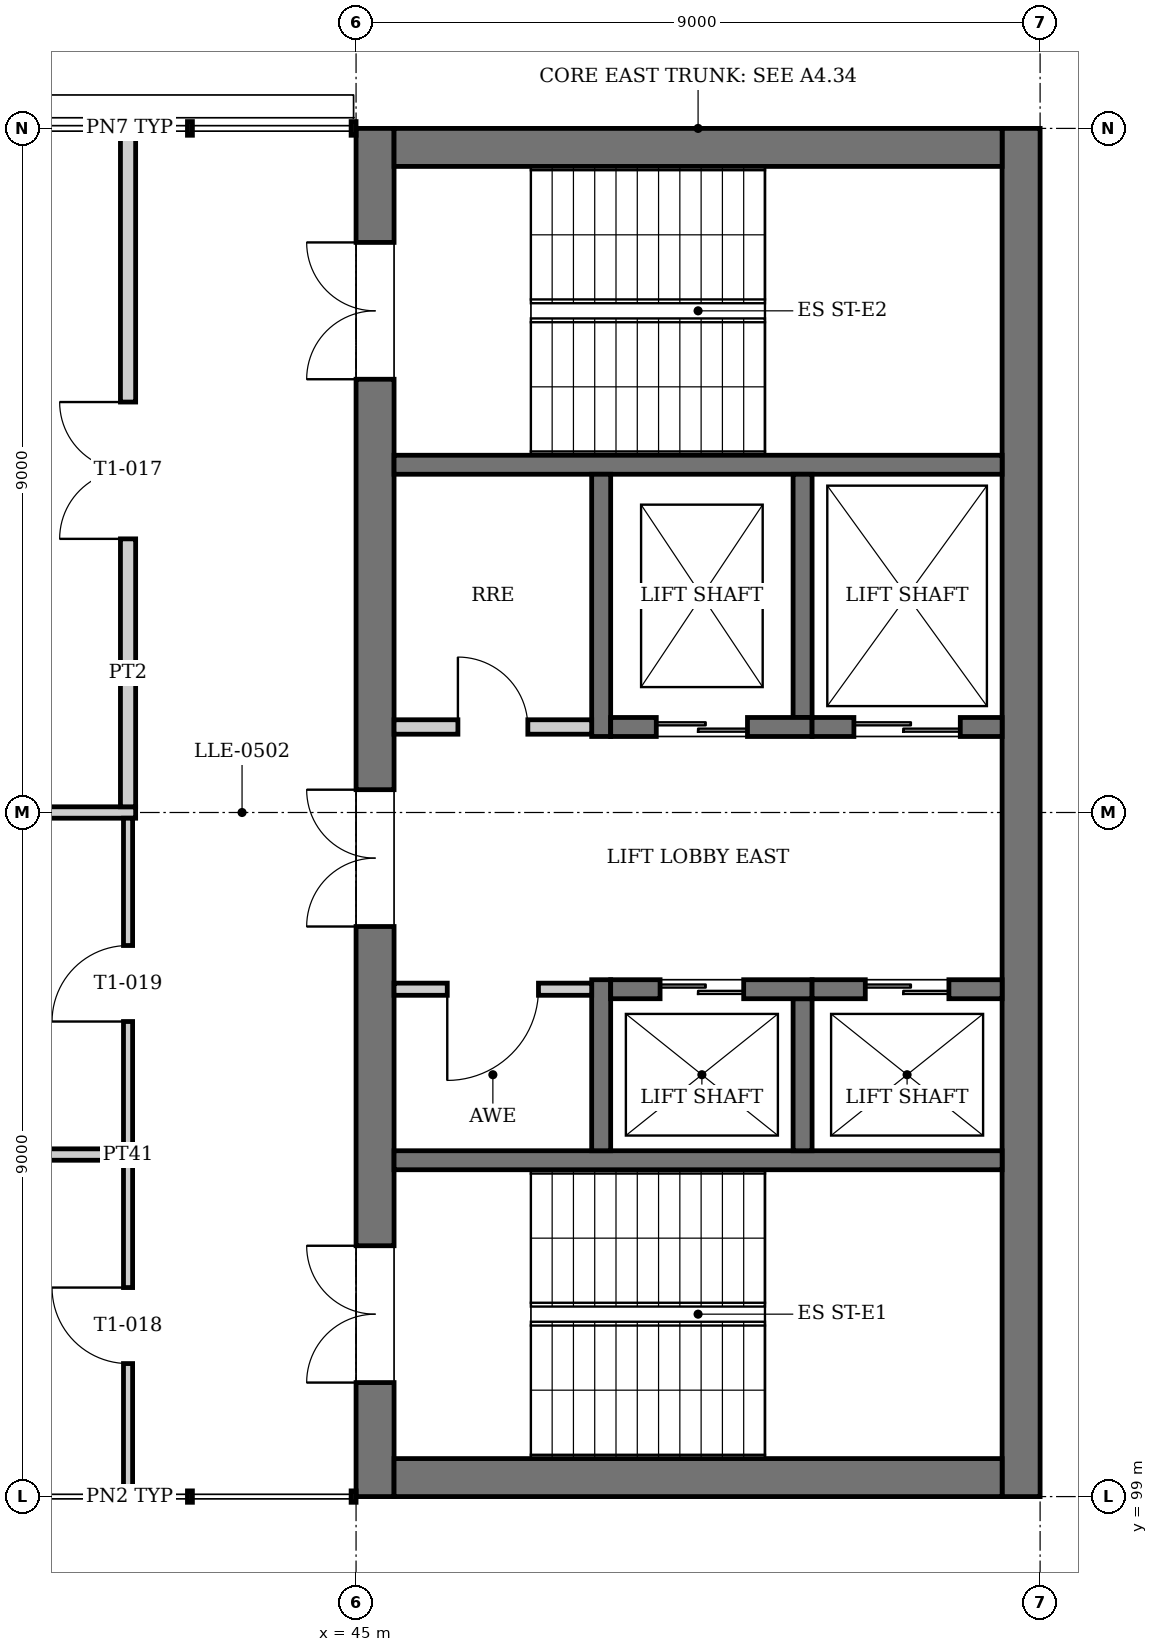
"""IFC4 building model, lengths in metres.
Left out: names, types, materials, properties, quantities, classifications, styles, units other than length and angle.
Written with IfcOpenShell. Run it as: python <this file> out.ifc"""

import sys

from ifc_helpers import new_model, si_unit, direction, frame, frame_2d, origin, place, context, subcontext, project, spatial, rectangle, extrude, element, fill, save


model = new_model("IFC4")
c1 = context("Model", 3, precision=1e-05, world=origin(), true_north=direction((0.0, 1.0)))
c2 = subcontext(c1, "Body", "Model", "MODEL_VIEW")
j1 = project(units=[si_unit("LENGTHUNIT", "METRE"), si_unit("PLANEANGLEUNIT", "RADIAN")], contexts=[c1])
p1 = place(None, origin())
s1 = spatial("IfcSite", under=j1, at=p1, CompositionType="ELEMENT")
p2 = place(p1, origin())
s2 = spatial("IfcBuilding", under=s1, at=p2, CompositionType="ELEMENT")
p3 = place(p2, frame((0.0, 0.0, 23.2)))
s3 = spatial("IfcBuildingStorey", under=s2, at=p3, CompositionType="ELEMENT", Elevation=23.2)
p4 = place(p3, frame((45.25, 99.0, 0.0), z_axis=(0.0, 0.0, 1.0), x_axis=(0.0, 1.0, 0.0)))
e1 = element("IfcWall", 1, at=p4, inside=s3, PredefinedType="SHEAR", context=c2, shape_type="SweptSolid", body=[
    extrude(rectangle(XDim=18.0, YDim=0.5, at=frame_2d((9.0, 0.0))), origin(), (0.0, 0.0, 1.0), 4.0),
])
p5 = place(p4, frame((1.5, 0.0, 0.0)))
e2 = element("IfcOpeningElement", 2, at=p5, cuts=e1, PredefinedType="OPENING", context=c2, shape_type="SweptSolid", body=[
    extrude(rectangle(XDim=1.8, YDim=2.1, at=frame_2d((0.9, 1.05))), frame((0.0, 0.26, 0.0), z_axis=(0.0, -1.0, 0.0), x_axis=(1.0, 0.0, 0.0)), (0.0, 0.0, 1.0), 0.52),
])
p6 = place(p4, frame((14.7, 0.0, 0.0)))
e3 = element("IfcOpeningElement", 3, at=p6, cuts=e1, PredefinedType="OPENING", context=c2, shape_type="SweptSolid", body=[
    extrude(rectangle(XDim=1.8, YDim=2.1, at=frame_2d((0.9, 1.05))), frame((0.0, 0.26, 0.0), z_axis=(0.0, -1.0, 0.0), x_axis=(1.0, 0.0, 0.0)), (0.0, 0.0, 1.0), 0.52),
])
p7 = place(p4, frame((7.5, 0.0, 0.0)))
e4 = element("IfcOpeningElement", 4, at=p7, cuts=e1, PredefinedType="OPENING", context=c2, shape_type="SweptSolid", body=[
    extrude(rectangle(XDim=1.8, YDim=2.1, at=frame_2d((0.9, 1.05))), frame((0.0, 0.26, 0.0), z_axis=(0.0, -1.0, 0.0), x_axis=(1.0, 0.0, 0.0)), (0.0, 0.0, 1.0), 0.52),
])
p8 = place(p3, frame((53.75, 99.0, 0.0), z_axis=(0.0, 0.0, 1.0), x_axis=(0.0, 1.0, 0.0)))
e5 = element("IfcWall", 5, at=p8, inside=s3, PredefinedType="SHEAR", context=c2, shape_type="SweptSolid", body=[
    extrude(rectangle(XDim=18.0, YDim=0.5, at=frame_2d((9.0, 0.0))), origin(), (0.0, 0.0, 1.0), 4.0),
])
for number, where, z_axis, x_axis in (
    (6, (45.5, 99.25, 0.0), (0.0, 0.0, 1.0), (1.0, 0.0, 0.0)),
    (7, (45.5, 116.75, 0.0), (0.0, 0.0, 1.0), (1.0, 0.0, 0.0)),
):
    element("IfcWall", number, at=place(p3, frame(where, z_axis=z_axis, x_axis=x_axis)), inside=s3, PredefinedType="SHEAR", context=c2, shape_type="SweptSolid", body=[
        extrude(rectangle(XDim=8.0, YDim=0.5, at=frame_2d((4.0, 0.0))), origin(), (0.0, 0.0, 1.0), 4.0),
    ])
for number, where, z_axis, x_axis in (
    (8, (45.5, 103.425, 0.0), (0.0, 0.0, 1.0), (1.0, 0.0, 0.0)),
    (9, (45.5, 112.575, 0.0), (0.0, 0.0, 1.0), (1.0, 0.0, 0.0)),
):
    element("IfcWall", number, at=place(p3, frame(where, z_axis=z_axis, x_axis=x_axis)), inside=s3, PredefinedType="SOLIDWALL", context=c2, shape_type="SweptSolid", body=[
        extrude(rectangle(XDim=8.0, YDim=0.25, at=frame_2d((4.0, 0.0))), origin(), (0.0, 0.0, 1.0), 3.75),
    ])
p9 = place(p3, frame((48.225, 103.55, 0.0), z_axis=(0.0, 0.0, 1.0), x_axis=(0.0, 1.0, 0.0)))
e10 = element("IfcWall", 10, at=p9, inside=s3, PredefinedType="SOLIDWALL", context=c2, shape_type="SweptSolid", body=[
    extrude(rectangle(XDim=2.25, YDim=0.25, at=frame_2d((1.125, 0.0))), origin(), (0.0, 0.0, 1.0), 4.0),
])
p10 = place(p3, frame((50.875, 103.55, 0.0), z_axis=(0.0, 0.0, 1.0), x_axis=(0.0, 1.0, 0.0)))
e11 = element("IfcWall", 11, at=p10, inside=s3, PredefinedType="SOLIDWALL", context=c2, shape_type="SweptSolid", body=[
    extrude(rectangle(XDim=2.0, YDim=0.25, at=frame_2d((1.0, 0.0))), origin(), (0.0, 0.0, 1.0), 4.0),
])
p11 = place(p3, frame((48.35, 105.675, 0.0), z_axis=(0.0, 0.0, 1.0), x_axis=(1.0, 0.0, 0.0)))
e12 = element("IfcWall", 12, at=p11, inside=s3, PredefinedType="SOLIDWALL", context=c2, shape_type="SweptSolid", body=[
    extrude(rectangle(XDim=2.65, YDim=0.25, at=frame_2d((1.325, 0.0))), origin(), (0.0, 0.0, 1.0), 4.0),
])
p12 = place(p11, frame((0.65, 0.0, 0.0)))
e13 = element("IfcOpeningElement", 13, at=p12, cuts=e12, PredefinedType="OPENING", context=c2, shape_type="SweptSolid", body=[
    extrude(rectangle(XDim=1.1, YDim=2.1, at=frame_2d((0.55, 1.05))), frame((0.0, 0.135, 0.0), z_axis=(0.0, -1.0, 0.0), x_axis=(1.0, 0.0, 0.0)), (0.0, 0.0, 1.0), 0.27),
])
p13 = place(p3, frame((51.0, 105.675, 0.0), z_axis=(0.0, 0.0, 1.0), x_axis=(1.0, 0.0, 0.0)))
e14 = element("IfcWall", 14, at=p13, inside=s3, PredefinedType="SOLIDWALL", context=c2, shape_type="SweptSolid", body=[
    extrude(rectangle(XDim=2.5, YDim=0.25, at=frame_2d((1.25, 0.0))), origin(), (0.0, 0.0, 1.0), 4.0),
])
p14 = place(p13, frame((0.7, 0.0, 0.0)))
e15 = element("IfcOpeningElement", 15, at=p14, cuts=e14, PredefinedType="OPENING", context=c2, shape_type="SweptSolid", body=[
    extrude(rectangle(XDim=1.1, YDim=2.1, at=frame_2d((0.55, 1.05))), frame((0.0, 0.135, 0.0), z_axis=(0.0, -1.0, 0.0), x_axis=(1.0, 0.0, 0.0)), (0.0, 0.0, 1.0), 0.27),
])
p15 = place(p3, frame((48.225, 109.0, 0.0), z_axis=(0.0, 0.0, 1.0), x_axis=(0.0, 1.0, 0.0)))
e16 = element("IfcWall", 16, at=p15, inside=s3, PredefinedType="SOLIDWALL", context=c2, shape_type="SweptSolid", body=[
    extrude(rectangle(XDim=3.45, YDim=0.25, at=frame_2d((1.725, 0.0))), origin(), (0.0, 0.0, 1.0), 4.0),
])
p16 = place(p3, frame((50.875, 109.25, 0.0), z_axis=(0.0, 0.0, 1.0), x_axis=(0.0, 1.0, 0.0)))
e17 = element("IfcWall", 17, at=p16, inside=s3, PredefinedType="SOLIDWALL", context=c2, shape_type="SweptSolid", body=[
    extrude(rectangle(XDim=3.2, YDim=0.25, at=frame_2d((1.6, 0.0))), origin(), (0.0, 0.0, 1.0), 4.0),
])
p17 = place(p3, frame((48.35, 109.125, 0.0), z_axis=(0.0, 0.0, 1.0), x_axis=(1.0, 0.0, 0.0)))
e18 = element("IfcWall", 18, at=p17, inside=s3, PredefinedType="SOLIDWALL", context=c2, shape_type="SweptSolid", body=[
    extrude(rectangle(XDim=2.65, YDim=0.25, at=frame_2d((1.325, 0.0))), origin(), (0.0, 0.0, 1.0), 4.0),
])
p18 = place(p17, frame((0.6, 0.0, 0.0)))
e19 = element("IfcOpeningElement", 19, at=p18, cuts=e18, PredefinedType="OPENING", context=c2, shape_type="SweptSolid", body=[
    extrude(rectangle(XDim=1.2, YDim=2.1, at=frame_2d((0.6, 1.05))), frame((0.0, 0.135, 0.0), z_axis=(0.0, -1.0, 0.0), x_axis=(1.0, 0.0, 0.0)), (0.0, 0.0, 1.0), 0.27),
])
p19 = place(p3, frame((51.0, 109.125, 0.0), z_axis=(0.0, 0.0, 1.0), x_axis=(1.0, 0.0, 0.0)))
e20 = element("IfcWall", 20, at=p19, inside=s3, PredefinedType="SOLIDWALL", context=c2, shape_type="SweptSolid", body=[
    extrude(rectangle(XDim=2.5, YDim=0.25, at=frame_2d((1.25, 0.0))), origin(), (0.0, 0.0, 1.0), 4.0),
])
p20 = place(p19, frame((0.55, 0.0, 0.0)))
e21 = element("IfcOpeningElement", 21, at=p20, cuts=e20, PredefinedType="OPENING", context=c2, shape_type="SweptSolid", body=[
    extrude(rectangle(XDim=1.4, YDim=2.4, at=frame_2d((0.7, 1.2))), frame((0.0, 0.135, 0.0), z_axis=(0.0, -1.0, 0.0), x_axis=(1.0, 0.0, 0.0)), (0.0, 0.0, 1.0), 0.27),
])
p21 = place(p3, frame((45.5, 105.675, 0.0), z_axis=(0.0, 0.0, 1.0), x_axis=(1.0, 0.0, 0.0)))
e22 = element("IfcWall", 22, at=p21, inside=s3, PredefinedType="PARTITIONING", context=c2, shape_type="SweptSolid", body=[
    extrude(rectangle(XDim=2.6, YDim=0.16, at=frame_2d((1.3, 0.0))), origin(), (0.0, 0.0, 1.0), 3.75),
])
p22 = place(p21, frame((0.7, 0.0, 0.0)))
e23 = element("IfcOpeningElement", 23, at=p22, cuts=e22, PredefinedType="OPENING", context=c2, shape_type="SweptSolid", body=[
    extrude(rectangle(XDim=1.2, YDim=2.1, at=frame_2d((0.6, 1.05))), frame((0.0, 0.09, 0.0), z_axis=(0.0, -1.0, 0.0), x_axis=(1.0, 0.0, 0.0)), (0.0, 0.0, 1.0), 0.18),
])
p23 = place(p3, frame((45.5, 109.125, 0.0), z_axis=(0.0, 0.0, 1.0), x_axis=(1.0, 0.0, 0.0)))
e24 = element("IfcWall", 24, at=p23, inside=s3, PredefinedType="PARTITIONING", context=c2, shape_type="SweptSolid", body=[
    extrude(rectangle(XDim=2.6, YDim=0.19, at=frame_2d((1.3, 0.0))), origin(), (0.0, 0.0, 1.0), 3.75),
])
p24 = place(p23, frame((0.84, 0.0, 0.0)))
e25 = element("IfcOpeningElement", 25, at=p24, cuts=e24, PredefinedType="OPENING", context=c2, shape_type="SweptSolid", body=[
    extrude(rectangle(XDim=0.92, YDim=2.1, at=frame_2d((0.46, 1.05))), frame((0.0, 0.105, 0.0), z_axis=(0.0, -1.0, 0.0), x_axis=(1.0, 0.0, 0.0)), (0.0, 0.0, 1.0), 0.21),
])
p25 = place(p3, frame((32.925, 103.5, 0.0), z_axis=(0.0, 0.0, 1.0), x_axis=(1.0, 0.0, 0.0)))
e26 = element("IfcWall", 26, at=p25, inside=s3, PredefinedType="PARTITIONING", context=c2, shape_type="SweptSolid", body=[
    extrude(rectangle(XDim=9.015, YDim=0.15, at=frame_2d((4.507, 0.0))), origin(), (0.0, 0.0, 1.0), 3.05),
])
p26 = place(p3, frame((32.925, 108.0, 0.0), z_axis=(0.0, 0.0, 1.0), x_axis=(1.0, 0.0, 0.0)))
e27 = element("IfcWall", 27, at=p26, inside=s3, PredefinedType="PARTITIONING", context=c2, shape_type="SweptSolid", body=[
    extrude(rectangle(XDim=9.175, YDim=0.15, at=frame_2d((4.587, 0.0))), origin(), (0.0, 0.0, 1.0), 3.05),
])
p27 = place(p3, frame((42.0, 99.075, 0.0), z_axis=(0.0, 0.0, 1.0), x_axis=(0.0, 1.0, 0.0)))
e28 = element("IfcWall", 28, at=p27, inside=s3, PredefinedType="PARTITIONING", context=c2, shape_type="SweptSolid", body=[
    extrude(rectangle(XDim=8.85, YDim=0.12, at=frame_2d((4.425, 0.0))), origin(), (0.0, 0.0, 1.0), 3.85),
])
p28 = place(p27, frame((1.675, 0.0, 0.0)))
e29 = element("IfcOpeningElement", 29, at=p28, cuts=e28, PredefinedType="OPENING", context=c2, shape_type="SweptSolid", body=[
    extrude(rectangle(XDim=1.0, YDim=2.1, at=frame_2d((0.5, 1.05))), frame((0.0, 0.07, 0.0), z_axis=(0.0, -1.0, 0.0), x_axis=(1.0, 0.0, 0.0)), (0.0, 0.0, 1.0), 0.14),
])
p29 = place(p27, frame((6.175, 0.0, 0.0)))
e30 = element("IfcOpeningElement", 30, at=p29, cuts=e28, PredefinedType="OPENING", context=c2, shape_type="SweptSolid", body=[
    extrude(rectangle(XDim=1.0, YDim=2.1, at=frame_2d((0.5, 1.05))), frame((0.0, 0.07, 0.0), z_axis=(0.0, -1.0, 0.0), x_axis=(1.0, 0.0, 0.0)), (0.0, 0.0, 1.0), 0.14),
])
p30 = place(p3, frame((42.0, 108.075, 0.0), z_axis=(0.0, 0.0, 1.0), x_axis=(0.0, 1.0, 0.0)))
e31 = element("IfcWall", 31, at=p30, inside=s3, PredefinedType="PARTITIONING", context=c2, shape_type="SweptSolid", body=[
    extrude(rectangle(XDim=8.835, YDim=0.2, at=frame_2d((4.417, 0.0))), origin(), (0.0, 0.0, 1.0), 3.85),
])
p31 = place(p30, frame((3.525, 0.0, 0.0)))
e32 = element("IfcOpeningElement", 32, at=p31, cuts=e31, PredefinedType="OPENING", context=c2, shape_type="SweptSolid", body=[
    extrude(rectangle(XDim=1.8, YDim=2.1, at=frame_2d((0.9, 1.05))), frame((0.0, 0.11, 0.0), z_axis=(0.0, -1.0, 0.0), x_axis=(1.0, 0.0, 0.0)), (0.0, 0.0, 1.0), 0.22),
])
p32 = place(p12, origin())
e33 = element("IfcDoor", 33, at=p32, inside=s3, OperationType="DOUBLE_DOOR_SLIDING", PredefinedType="DOOR", context=c2, shape_type="SweptSolid", body=[
    extrude(rectangle(XDim=1.1, YDim=2.1, at=frame_2d((0.55, 1.05))), frame((0.0, 0.025, 0.0), z_axis=(0.0, -1.0, 0.0), x_axis=(1.0, 0.0, 0.0)), (0.0, 0.0, 1.0), 0.05),
])
fill(e13, e33)
p33 = place(p14, origin())
e34 = element("IfcDoor", 34, at=p33, inside=s3, OperationType="DOUBLE_DOOR_SLIDING", PredefinedType="DOOR", context=c2, shape_type="SweptSolid", body=[
    extrude(rectangle(XDim=1.1, YDim=2.1, at=frame_2d((0.55, 1.05))), frame((0.0, 0.025, 0.0), z_axis=(0.0, -1.0, 0.0), x_axis=(1.0, 0.0, 0.0)), (0.0, 0.0, 1.0), 0.05),
])
fill(e15, e34)
p34 = place(p18, origin())
e35 = element("IfcDoor", 35, at=p34, inside=s3, OperationType="DOUBLE_DOOR_SLIDING", PredefinedType="DOOR", context=c2, shape_type="SweptSolid", body=[
    extrude(rectangle(XDim=1.2, YDim=2.1, at=frame_2d((0.6, 1.05))), frame((0.0, 0.025, 0.0), z_axis=(0.0, -1.0, 0.0), x_axis=(1.0, 0.0, 0.0)), (0.0, 0.0, 1.0), 0.05),
])
fill(e19, e35)
p35 = place(p20, origin())
e36 = element("IfcDoor", 36, at=p35, inside=s3, OperationType="DOUBLE_DOOR_SLIDING", PredefinedType="DOOR", context=c2, shape_type="SweptSolid", body=[
    extrude(rectangle(XDim=1.4, YDim=2.4, at=frame_2d((0.7, 1.2))), frame((0.0, 0.025, 0.0), z_axis=(0.0, -1.0, 0.0), x_axis=(1.0, 0.0, 0.0)), (0.0, 0.0, 1.0), 0.05),
])
fill(e21, e36)
p36 = place(p31, origin())
e37 = element("IfcDoor", 37, at=p36, inside=s3, OperationType="DOUBLE_DOOR_SINGLE_SWING", PredefinedType="DOOR", context=c2, shape_type="SweptSolid", body=[
    extrude(rectangle(XDim=1.8, YDim=2.1, at=frame_2d((0.9, 1.05))), frame((0.0, 0.025, 0.0), z_axis=(0.0, -1.0, 0.0), x_axis=(1.0, 0.0, 0.0)), (0.0, 0.0, 1.0), 0.05),
])
fill(e32, e37)
p37 = place(p28, origin())
e38 = element("IfcDoor", 38, at=p37, inside=s3, OperationType="SINGLE_SWING_RIGHT", PredefinedType="DOOR", context=c2, shape_type="SweptSolid", body=[
    extrude(rectangle(XDim=1.0, YDim=2.1, at=frame_2d((0.5, 1.05))), frame((0.0, 0.025, 0.0), z_axis=(0.0, -1.0, 0.0), x_axis=(1.0, 0.0, 0.0)), (0.0, 0.0, 1.0), 0.05),
])
fill(e29, e38)
p38 = place(p29, origin())
e39 = element("IfcDoor", 39, at=p38, inside=s3, OperationType="SINGLE_SWING_LEFT", PredefinedType="DOOR", context=c2, shape_type="SweptSolid", body=[
    extrude(rectangle(XDim=1.0, YDim=2.1, at=frame_2d((0.5, 1.05))), frame((0.0, 0.025, 0.0), z_axis=(0.0, -1.0, 0.0), x_axis=(1.0, 0.0, 0.0)), (0.0, 0.0, 1.0), 0.05),
])
fill(e30, e39)
p39 = place(p5, origin())
e40 = element("IfcDoor", 40, at=p39, inside=s3, OperationType="DOUBLE_DOOR_SINGLE_SWING", PredefinedType="DOOR", context=c2, shape_type="SweptSolid", body=[
    extrude(rectangle(XDim=1.8, YDim=2.1, at=frame_2d((0.9, 1.05))), frame((0.0, 0.025, 0.0), z_axis=(0.0, -1.0, 0.0), x_axis=(1.0, 0.0, 0.0)), (0.0, 0.0, 1.0), 0.05),
])
fill(e2, e40)
p40 = place(p6, origin())
e41 = element("IfcDoor", 41, at=p40, inside=s3, OperationType="DOUBLE_DOOR_SINGLE_SWING", PredefinedType="DOOR", context=c2, shape_type="SweptSolid", body=[
    extrude(rectangle(XDim=1.8, YDim=2.1, at=frame_2d((0.9, 1.05))), frame((0.0, 0.025, 0.0), z_axis=(0.0, -1.0, 0.0), x_axis=(1.0, 0.0, 0.0)), (0.0, 0.0, 1.0), 0.05),
])
fill(e3, e41)
p41 = place(p7, origin())
e42 = element("IfcDoor", 42, at=p41, inside=s3, OperationType="DOUBLE_DOOR_SINGLE_SWING", PredefinedType="DOOR", context=c2, shape_type="SweptSolid", body=[
    extrude(rectangle(XDim=1.8, YDim=2.1, at=frame_2d((0.9, 1.05))), frame((0.0, 0.025, 0.0), z_axis=(0.0, -1.0, 0.0), x_axis=(1.0, 0.0, 0.0)), (0.0, 0.0, 1.0), 0.05),
])
fill(e4, e42)
p42 = place(p22, frame((1.2, 0.0, 0.0), z_axis=(0.0, 0.0, 1.0), x_axis=(-1.0, 0.0, 0.0)))
e43 = element("IfcDoor", 43, at=p42, inside=s3, OperationType="SINGLE_SWING_RIGHT", PredefinedType="DOOR", context=c2, shape_type="SweptSolid", body=[
    extrude(rectangle(XDim=1.2, YDim=2.1, at=frame_2d((0.6, 1.05))), frame((0.0, 0.025, 0.0), z_axis=(0.0, -1.0, 0.0), x_axis=(1.0, 0.0, 0.0)), (0.0, 0.0, 1.0), 0.05),
])
fill(e23, e43)
p43 = place(p24, origin())
e44 = element("IfcDoor", 44, at=p43, inside=s3, OperationType="SINGLE_SWING_LEFT", PredefinedType="DOOR", context=c2, shape_type="SweptSolid", body=[
    extrude(rectangle(XDim=0.92, YDim=2.1, at=frame_2d((0.46, 1.05))), frame((0.0, 0.025, 0.0), z_axis=(0.0, -1.0, 0.0), x_axis=(1.0, 0.0, 0.0)), (0.0, 0.0, 1.0), 0.05),
])
fill(e25, e44)
save(model, sys.argv[1])
